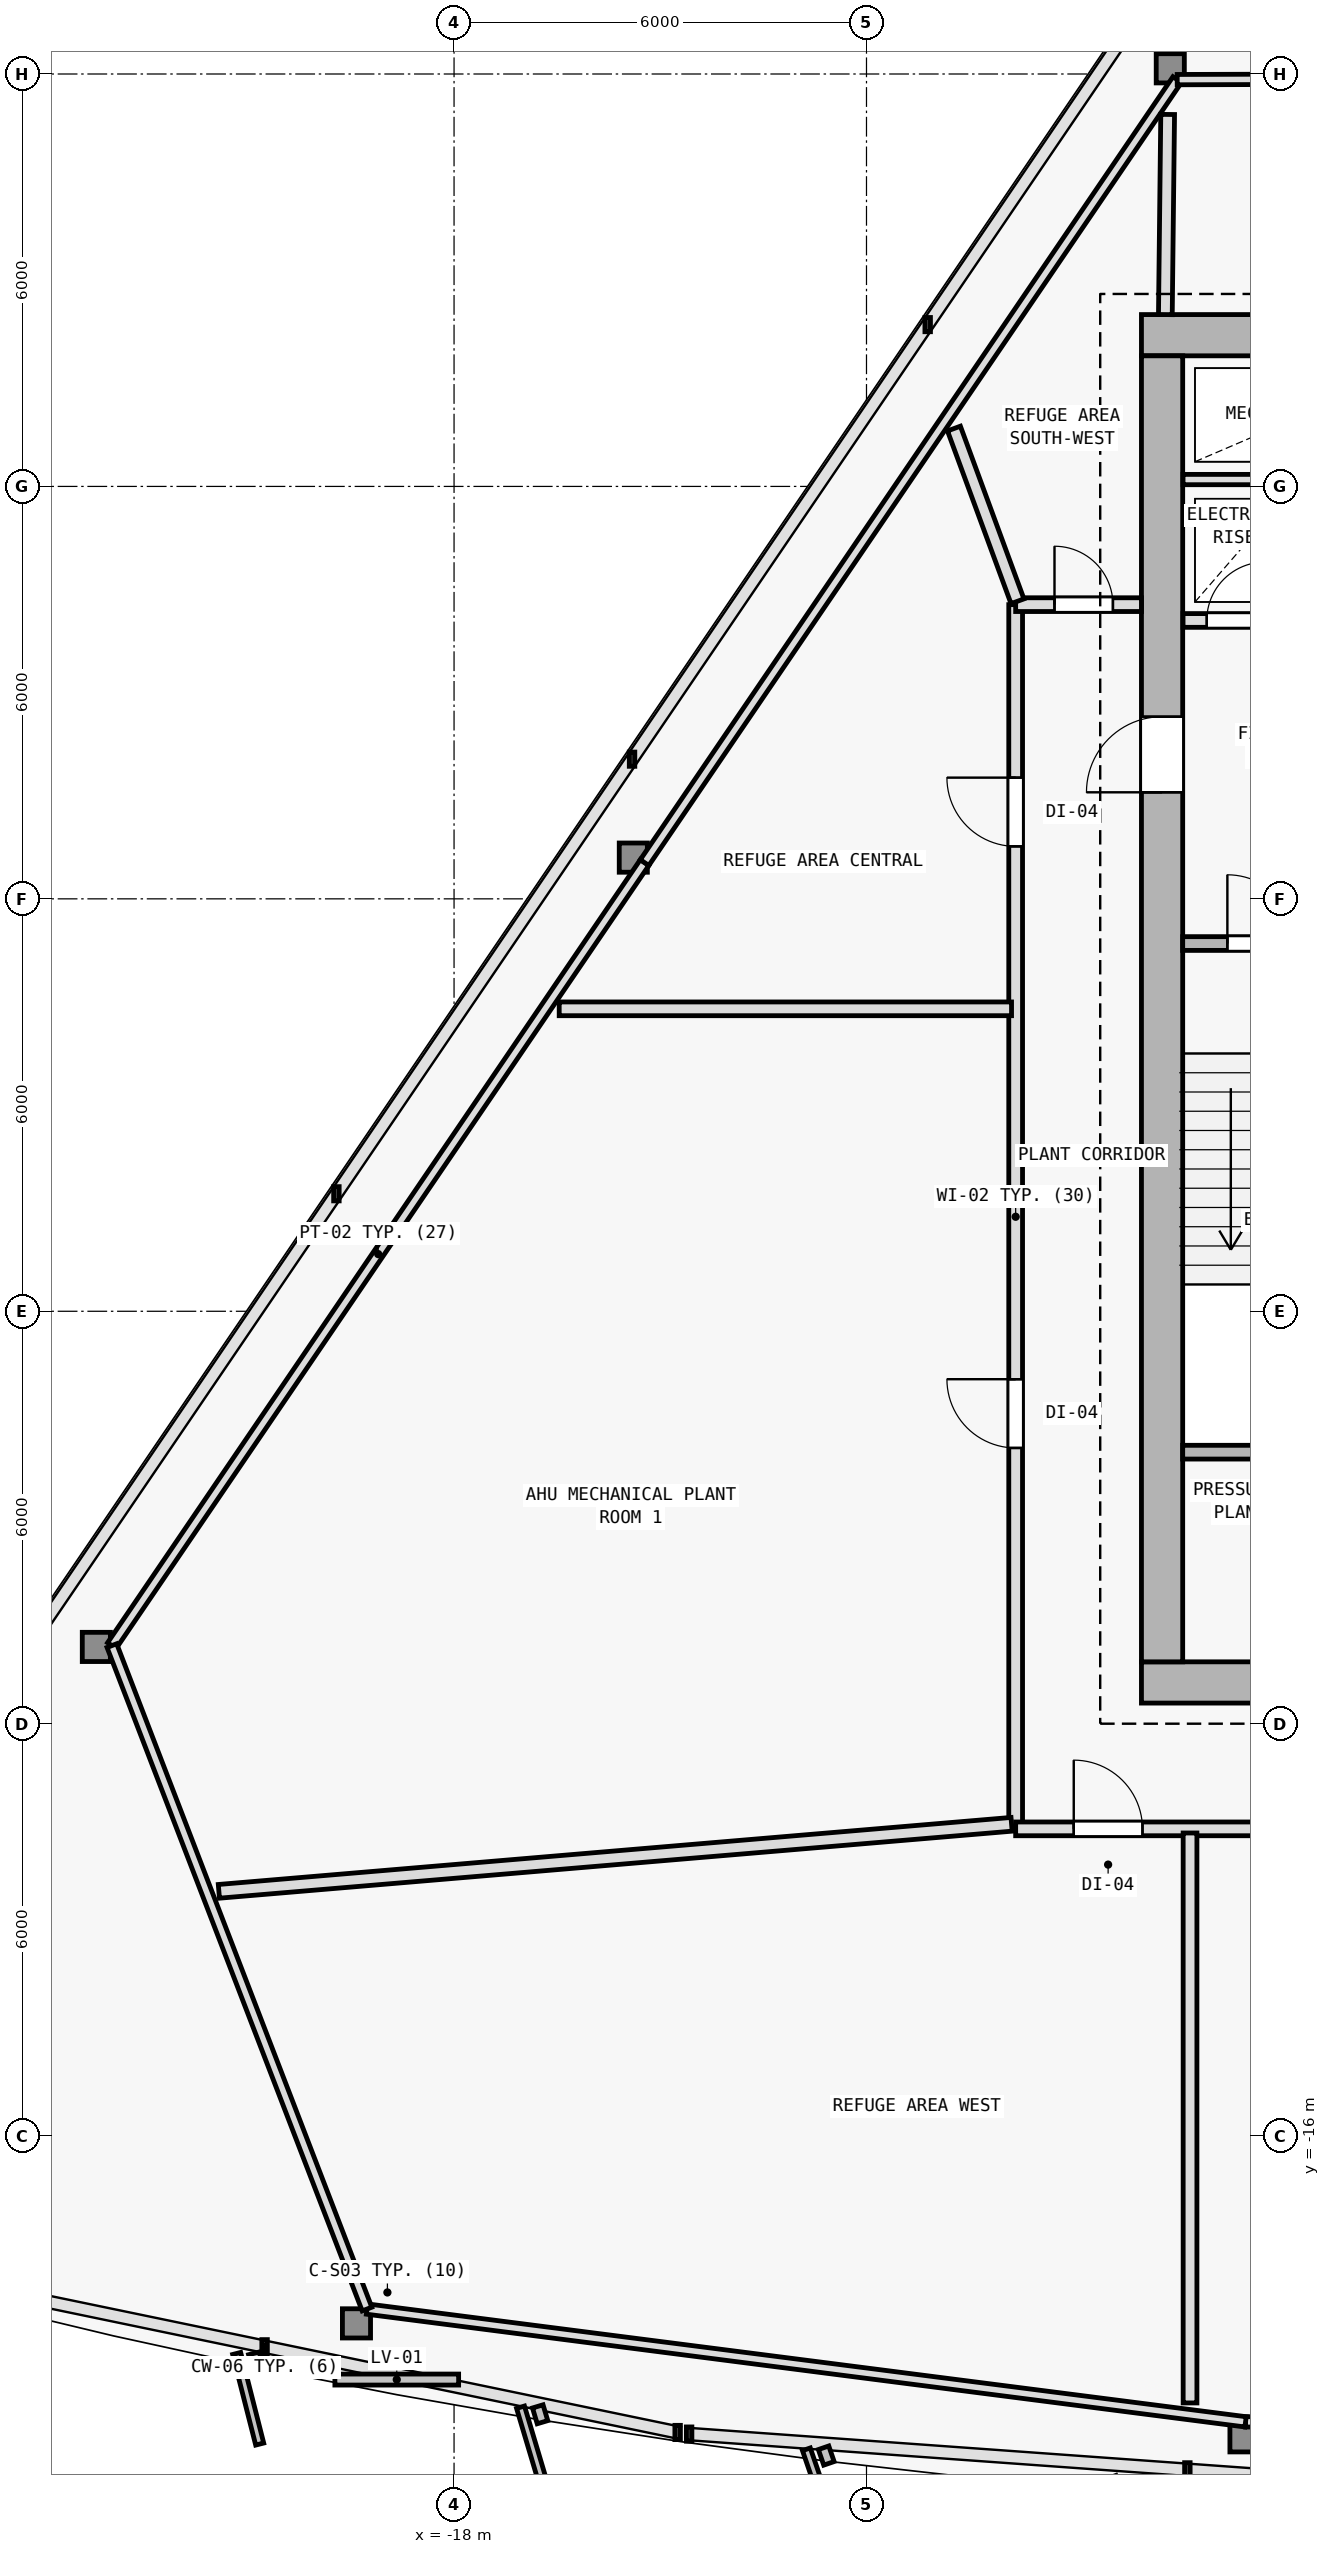
"""IFC4 building model, lengths in metres.
Left out: names, types, materials, properties, quantities, classifications, styles, units other than length and angle.
Written with IfcOpenShell. Run it as: python <this file> out.ifc"""

import sys

from ifc_helpers import new_model, si_unit, direction, frame, frame_2d, origin, origin_2d, place, context, subcontext, project, spatial, rectangle, i_section, extrude, element, fill, save


model = new_model("IFC4")
c1 = context("Model", 3, precision=1e-05, world=origin(), true_north=direction((0.0, 1.0)))
c2 = subcontext(c1, "Body", "Model", "MODEL_VIEW")
j1 = project(units=[si_unit("LENGTHUNIT", "METRE"), si_unit("PLANEANGLEUNIT", "RADIAN")], contexts=[c1])
p1 = place(None, origin())
s1 = spatial("IfcSite", under=j1, at=p1, CompositionType="ELEMENT")
p2 = place(p1, origin())
s2 = spatial("IfcBuilding", under=s1, at=p2, CompositionType="ELEMENT")
p3 = place(p2, frame((0.0, 0.0, 73.2)))
s3 = spatial("IfcBuildingStorey", under=s2, at=p3, CompositionType="ELEMENT", Elevation=73.2)
for number, where, z_axis, x_axis in (
    (1, (-7.7, -9.4, 0.0), (0.0, 0.0, 1.0), (1.0, 0.0, 0.0)),
    (2, (-7.7, 10.2, 0.0), (0.0, 0.0, 1.0), (1.0, 0.0, 0.0)),
    (3, (-7.7, 2.0, 0.0), (0.0, 0.0, 1.0), (1.0, 0.0, 0.0)),
):
    element("IfcColumn", number, at=place(p3, frame(where, z_axis=z_axis, x_axis=x_axis)), inside=s3, PredefinedType="COLUMN", context=c2, shape_type="SweptSolid", body=[
        extrude(i_section(OverallWidth=0.416, OverallDepth=0.446, WebThickness=0.025, FlangeThickness=0.04, FilletRadius=0.015, at=origin_2d()), origin(), (0.0, 0.0, 1.0), 4.8),
    ])
p4 = place(p3, frame((-19.42, -18.724, 0.006), z_axis=(0.01589889458, 0.025784745697, 0.999541080717), x_axis=(-0.851195920716, 0.524848077596, 0.0)))
e4 = element("IfcColumn", 4, at=p4, inside=s3, PredefinedType="COLUMN", context=c2, shape_type="SweptSolid", body=[
    extrude(i_section(OverallWidth=0.409, OverallDepth=0.425, WebThickness=0.021, FlangeThickness=0.034, FilletRadius=0.015, at=origin_2d()), origin(), (0.0, 0.0, 1.0), 4.791),
])
p5 = place(p3, frame((-6.509, -20.382, 0.006), z_axis=(0.005350994341, 0.027162666512, 0.999616704746), x_axis=(-0.981142984211, 0.193283327096, 0.0)))
e5 = element("IfcColumn", 5, at=p5, inside=s3, PredefinedType="COLUMN", context=c2, shape_type="SweptSolid", body=[
    extrude(i_section(OverallWidth=0.409, OverallDepth=0.425, WebThickness=0.021, FlangeThickness=0.034, FilletRadius=0.015, at=origin_2d()), origin(), (0.0, 0.0, 1.0), 4.791),
])
p6 = place(p3, frame((-7.581, 14.083, 0.006), z_axis=(0.006780355843, -0.001988224646, 0.999975036557), x_axis=(0.281384988428, 0.959594960537, 0.0)))
e6 = element("IfcColumn", 6, at=p6, inside=s3, PredefinedType="COLUMN", context=c2, shape_type="SweptSolid", body=[
    extrude(i_section(OverallWidth=0.409, OverallDepth=0.425, WebThickness=0.021, FlangeThickness=0.034, FilletRadius=0.015, at=origin_2d()), origin(), (0.0, 0.0, 1.0), 4.789),
])
p7 = place(p3, frame((-15.392, 2.6, 0.006), z_axis=(0.013100740252, 0.007340492593, 0.999887237529), x_axis=(-0.488810085697, 0.87239022239, 0.0)))
e7 = element("IfcColumn", 7, at=p7, inside=s3, PredefinedType="COLUMN", context=c2, shape_type="SweptSolid", body=[
    extrude(i_section(OverallWidth=0.409, OverallDepth=0.425, WebThickness=0.021, FlangeThickness=0.034, FilletRadius=0.015, at=origin_2d()), origin(), (0.0, 0.0, 1.0), 4.789),
])
p8 = place(p3, frame((-23.204, -8.883, 0.006), z_axis=(0.019468495457, 0.016665439828, 0.999671566466), x_axis=(-0.65029991508, 0.759677576638, 0.0)))
e8 = element("IfcColumn", 8, at=p8, inside=s3, PredefinedType="COLUMN", context=c2, shape_type="SweptSolid", body=[
    extrude(i_section(OverallWidth=0.409, OverallDepth=0.425, WebThickness=0.021, FlangeThickness=0.034, FilletRadius=0.015, at=origin_2d()), origin(), (0.0, 0.0, 1.0), 4.79),
])
p9 = place(p3, frame((-8.0, -9.4, 0.0), z_axis=(0.0, 0.0, 1.0), x_axis=(1.0, 0.0, 0.0)))
e9 = element("IfcWall", 9, at=p9, inside=s3, PredefinedType="SHEAR", context=c2, shape_type="SweptSolid", body=[
    extrude(rectangle(XDim=16.0, YDim=0.6, at=frame_2d((8.0, 0.0))), origin(), (0.0, 0.0, 1.0), 4.5),
])
p10 = place(p9, frame((9.65, 0.0, 0.0)))
e10 = element("IfcOpeningElement", 10, at=p10, cuts=e9, PredefinedType="OPENING", context=c2, shape_type="SweptSolid", body=[
    extrude(rectangle(XDim=1.5, YDim=2.2, at=frame_2d((0.75, 1.1))), frame((0.0, 0.31, 0.0), z_axis=(0.0, -1.0, 0.0), x_axis=(1.0, 0.0, 0.0)), (0.0, 0.0, 1.0), 0.62),
])
p11 = place(p3, frame((8.0, 10.2, 0.0), z_axis=(0.0, 0.0, 1.0), x_axis=(-1.0, 0.0, 0.0)))
e11 = element("IfcWall", 11, at=p11, inside=s3, PredefinedType="SHEAR", context=c2, shape_type="SweptSolid", body=[
    extrude(rectangle(XDim=16.0, YDim=0.6, at=frame_2d((8.0, 0.0))), origin(), (0.0, 0.0, 1.0), 4.5),
])
p12 = place(p3, frame((-7.7, -9.1, 0.0), z_axis=(0.0, 0.0, 1.0), x_axis=(0.0, 1.0, 0.0)))
e12 = element("IfcWall", 12, at=p12, inside=s3, PredefinedType="SHEAR", context=c2, shape_type="SweptSolid", body=[
    extrude(rectangle(XDim=19.0, YDim=0.6, at=frame_2d((9.5, 0.0))), origin(), (0.0, 0.0, 1.0), 4.5),
])
p13 = place(p12, frame((12.65, 0.0, 0.0)))
e13 = element("IfcOpeningElement", 13, at=p13, cuts=e12, PredefinedType="OPENING", context=c2, shape_type="SweptSolid", body=[
    extrude(rectangle(XDim=1.1, YDim=2.15, at=frame_2d((0.55, 1.075))), frame((0.0, 0.31, 0.0), z_axis=(0.0, -1.0, 0.0), x_axis=(1.0, 0.0, 0.0)), (0.0, 0.0, 1.0), 0.62),
])
p14 = place(p3, frame((-7.4, 1.35, 0.0), z_axis=(0.0, 0.0, 1.0), x_axis=(1.0, 0.0, 0.0)))
e14 = element("IfcWall", 14, at=p14, inside=s3, PredefinedType="SOLIDWALL", context=c2, shape_type="SweptSolid", body=[
    extrude(rectangle(XDim=3.35, YDim=0.2, at=frame_2d((1.675, 0.0))), origin(), (0.0, 0.0, 1.0), 4.5),
])
p15 = place(p14, frame((0.65, 0.0, 0.0)))
e15 = element("IfcOpeningElement", 15, at=p15, cuts=e14, PredefinedType="OPENING", context=c2, shape_type="SweptSolid", body=[
    extrude(rectangle(XDim=1.0, YDim=2.15, at=frame_2d((0.5, 1.075))), frame((0.0, 0.11, 0.0), z_axis=(0.0, -1.0, 0.0), x_axis=(1.0, 0.0, 0.0)), (0.0, 0.0, 1.0), 0.22),
])
p16 = place(p3, frame((-7.395, 6.05, 0.0), z_axis=(0.0, 0.0, 1.0), x_axis=(1.0, 0.0, 0.0)))
e16 = element("IfcWall", 16, at=p16, inside=s3, PredefinedType="SOLIDWALL", context=c2, shape_type="SweptSolid", body=[
    extrude(rectangle(XDim=3.545, YDim=0.2, at=frame_2d((1.772, 0.0))), origin(), (0.0, 0.0, 1.0), 4.5),
])
p17 = place(p16, frame((0.345, 0.0, 0.0)))
e17 = element("IfcOpeningElement", 17, at=p17, cuts=e16, PredefinedType="OPENING", context=c2, shape_type="SweptSolid", body=[
    extrude(rectangle(XDim=0.85, YDim=2.1, at=frame_2d((0.425, 1.05))), frame((0.0, 0.11, 0.0), z_axis=(0.0, -1.0, 0.0), x_axis=(1.0, 0.0, 0.0)), (0.0, 0.0, 1.0), 0.22),
])
p18 = place(p16, frame((2.145, 0.0, 0.0)))
e18 = element("IfcOpeningElement", 18, at=p18, cuts=e16, PredefinedType="OPENING", context=c2, shape_type="SweptSolid", body=[
    extrude(rectangle(XDim=0.85, YDim=2.1, at=frame_2d((0.425, 1.05))), frame((0.0, 0.11, 0.0), z_axis=(0.0, -1.0, 0.0), x_axis=(1.0, 0.0, 0.0)), (0.0, 0.0, 1.0), 0.22),
])
p19 = place(p3, frame((-7.395, 8.1, 0.0), z_axis=(0.0, 0.0, 1.0), x_axis=(1.0, 0.0, 0.0)))
e19 = element("IfcWall", 19, at=p19, inside=s3, PredefinedType="PARTITIONING", context=c2, shape_type="SweptSolid", body=[
    extrude(rectangle(XDim=3.545, YDim=0.15, at=frame_2d((1.772, 0.0))), origin(), (0.0, 0.0, 1.0), 4.5),
])
p20 = place(p3, frame((-7.4, -6.05, 0.0), z_axis=(0.0, 0.0, 1.0), x_axis=(1.0, 0.0, 0.0)))
e20 = element("IfcWall", 20, at=p20, inside=s3, PredefinedType="SOLIDWALL", context=c2, shape_type="SweptSolid", body=[
    extrude(rectangle(XDim=3.35, YDim=0.2, at=frame_2d((1.675, 0.0))), origin(), (0.0, 0.0, 1.0), 4.5),
])
p21 = place(p3, frame((-22.978, -8.864, 0.0), z_axis=(0.0, 0.0, 1.0), x_axis=(0.562466083544, 0.826820358278, 0.0)))
e21 = element("IfcWall", 21, at=p21, inside=s3, PredefinedType="PARTITIONING", context=c2, shape_type="SweptSolid", body=[
    extrude(rectangle(XDim=13.777, YDim=0.15, at=frame_2d((6.889, 0.0))), origin(), (0.0, 0.0, 1.0), 3.759),
])
p22 = place(p3, frame((-15.229, 2.527, 0.0), z_axis=(0.0, 0.0, 1.0), x_axis=(0.562470451541, 0.826817386817, 0.0)))
e22 = element("IfcWall", 22, at=p22, inside=s3, PredefinedType="PARTITIONING", context=c2, shape_type="SweptSolid", body=[
    extrude(rectangle(XDim=13.777, YDim=0.15, at=frame_2d((6.888, 0.0))), origin(), (0.0, 0.0, 1.0), 3.875),
])
p23 = place(p3, frame((-7.48, 13.918, 0.0), z_axis=(0.0, 0.0, 1.0), x_axis=(0.999996272289, 0.00273045938, 0.0)))
e23 = element("IfcWall", 23, at=p23, inside=s3, PredefinedType="PARTITIONING", context=c2, shape_type="SweptSolid", body=[
    extrude(rectangle(XDim=17.704, YDim=0.15, at=frame_2d((8.852, 0.0))), origin(), (0.0, 0.0, 1.0), 3.875),
])
p24 = place(p3, frame((6.486, -20.157, 0.0), z_axis=(0.0, 0.0, 1.0), x_axis=(-1.0, 0.0, 0.0)))
e24 = element("IfcWall", 24, at=p24, inside=s3, PredefinedType="PARTITIONING", context=c2, shape_type="SweptSolid", body=[
    extrude(rectangle(XDim=12.971, YDim=0.15, at=frame_2d((6.486, 0.0))), origin(), (0.0, 0.0, 1.0), 3.875),
])
p25 = place(p3, frame((-6.486, -20.157, 0.0), z_axis=(0.0, 0.0, 1.0), x_axis=(-0.991859037986, 0.127340679929, 0.0)))
e25 = element("IfcWall", 25, at=p25, inside=s3, PredefinedType="PARTITIONING", context=c2, shape_type="SweptSolid", body=[
    extrude(rectangle(XDim=12.886, YDim=0.15, at=frame_2d((6.443, 0.0))), origin(), (0.0, 0.0, 1.0), 3.875),
])
p26 = place(p3, frame((-19.266, -18.516, 0.0), z_axis=(0.0, 0.0, 1.0), x_axis=(-0.358930035046, 0.933364467902, 0.0)))
e26 = element("IfcWall", 26, at=p26, inside=s3, PredefinedType="PARTITIONING", context=c2, shape_type="SweptSolid", body=[
    extrude(rectangle(XDim=10.341, YDim=0.15, at=frame_2d((5.17, 0.0))), origin(), (0.0, 0.0, 1.0), 3.759),
])
p27 = place(p3, frame((-9.83, -11.53, 0.0), z_axis=(0.0, 0.0, 1.0), x_axis=(0.0, 1.0, 0.0)))
e27 = element("IfcWall", 27, at=p27, inside=s3, PredefinedType="SOLIDWALL", context=c2, shape_type="SweptSolid", body=[
    extrude(rectangle(XDim=17.81, YDim=0.2, at=frame_2d((8.905, 0.0))), origin(), (0.0, 0.0, 1.0), 3.759),
])
p28 = place(p27, frame((5.542, 0.0, 0.0)))
e28 = element("IfcOpeningElement", 28, at=p28, cuts=e27, PredefinedType="OPENING", context=c2, shape_type="SweptSolid", body=[
    extrude(rectangle(XDim=1.0, YDim=2.15, at=frame_2d((0.5, 1.075))), frame((0.0, 0.11, 0.0), z_axis=(0.0, -1.0, 0.0), x_axis=(1.0, 0.0, 0.0)), (0.0, 0.0, 1.0), 0.22),
])
p29 = place(p27, frame((14.293, 0.0, 0.0)))
e29 = element("IfcOpeningElement", 29, at=p29, cuts=e27, PredefinedType="OPENING", context=c2, shape_type="SweptSolid", body=[
    extrude(rectangle(XDim=1.0, YDim=2.15, at=frame_2d((0.5, 1.075))), frame((0.0, 0.11, 0.0), z_axis=(0.0, -1.0, 0.0), x_axis=(1.0, 0.0, 0.0)), (0.0, 0.0, 1.0), 0.22),
])
p30 = place(p3, frame((-9.83, 6.28, 0.0), z_axis=(0.0, 0.0, 1.0), x_axis=(1.0, 0.0, 0.0)))
e30 = element("IfcWall", 30, at=p30, inside=s3, PredefinedType="SOLIDWALL", context=c2, shape_type="SweptSolid", body=[
    extrude(rectangle(XDim=1.83, YDim=0.2, at=frame_2d((0.915, 0.0))), origin(), (0.0, 0.0, 1.0), 3.925),
])
p31 = place(p30, frame((0.565, 0.0, 0.0)))
e31 = element("IfcOpeningElement", 31, at=p31, cuts=e30, PredefinedType="OPENING", context=c2, shape_type="SweptSolid", body=[
    extrude(rectangle(XDim=0.85, YDim=2.1, at=frame_2d((0.425, 1.05))), frame((0.0, 0.11, 0.0), z_axis=(0.0, -1.0, 0.0), x_axis=(1.0, 0.0, 0.0)), (0.0, 0.0, 1.0), 0.22),
])
p32 = place(p3, frame((-9.83, -11.53, 0.0), z_axis=(0.0, 0.0, 1.0), x_axis=(1.0, 0.0, 0.0)))
e32 = element("IfcWall", 32, at=p32, inside=s3, PredefinedType="SOLIDWALL", context=c2, shape_type="SweptSolid", body=[
    extrude(rectangle(XDim=19.66, YDim=0.2, at=frame_2d((9.83, 0.0))), origin(), (0.0, 0.0, 1.0), 3.875),
])
p33 = place(p32, frame((0.845, 0.0, 0.0)))
e33 = element("IfcOpeningElement", 33, at=p33, cuts=e32, PredefinedType="OPENING", context=c2, shape_type="SweptSolid", body=[
    extrude(rectangle(XDim=1.0, YDim=2.15, at=frame_2d((0.5, 1.075))), frame((0.0, 0.11, 0.0), z_axis=(0.0, -1.0, 0.0), x_axis=(1.0, 0.0, 0.0)), (0.0, 0.0, 1.0), 0.22),
])
p34 = place(p32, frame((9.33, 0.0, 0.0)))
e34 = element("IfcOpeningElement", 34, at=p34, cuts=e32, PredefinedType="OPENING", context=c2, shape_type="SweptSolid", body=[
    extrude(rectangle(XDim=1.0, YDim=2.15, at=frame_2d((0.5, 1.075))), frame((0.0, 0.11, 0.0), z_axis=(0.0, -1.0, 0.0), x_axis=(1.0, 0.0, 0.0)), (0.0, 0.0, 1.0), 0.22),
])
p35 = place(p32, frame((17.815, 0.0, 0.0)))
e35 = element("IfcOpeningElement", 35, at=p35, cuts=e32, PredefinedType="OPENING", context=c2, shape_type="SweptSolid", body=[
    extrude(rectangle(XDim=1.0, YDim=2.15, at=frame_2d((0.5, 1.075))), frame((0.0, 0.11, 0.0), z_axis=(0.0, -1.0, 0.0), x_axis=(1.0, 0.0, 0.0)), (0.0, 0.0, 1.0), 0.22),
])
p36 = place(p3, frame((-9.89, 0.4, 0.0), z_axis=(0.0, 0.0, 1.0), x_axis=(-1.0, 0.0, 0.0)))
e36 = element("IfcWall", 36, at=p36, inside=s3, PredefinedType="SOLIDWALL", context=c2, shape_type="SweptSolid", body=[
    extrude(rectangle(XDim=6.58, YDim=0.2, at=frame_2d((3.29, 0.0))), origin(), (0.0, 0.0, 1.0), 3.975),
])
p37 = place(p3, frame((-9.889, -11.464, 0.0), z_axis=(0.0, 0.0, 1.0), x_axis=(-0.996442430759, -0.084276225487, 0.0)))
e37 = element("IfcWall", 37, at=p37, inside=s3, PredefinedType="SOLIDWALL", context=c2, shape_type="SweptSolid", body=[
    extrude(rectangle(XDim=11.573, YDim=0.2, at=frame_2d((5.787, 0.0))), origin(), (0.0, 0.0, 1.0), 3.875),
])
p38 = place(p3, frame((-7.293, -11.59, 0.0), z_axis=(0.0, 0.0, 1.0), x_axis=(0.0, -1.0, 0.0)))
e38 = element("IfcWall", 38, at=p38, inside=s3, PredefinedType="SOLIDWALL", context=c2, shape_type="SweptSolid", body=[
    extrude(rectangle(XDim=8.292, YDim=0.2, at=frame_2d((4.146, 0.0))), origin(), (0.0, 0.0, 1.0), 3.975),
])
p39 = place(p3, frame((-7.652, 10.5, 0.0), z_axis=(0.0, 0.0, 1.0), x_axis=(0.011402914465, 0.999934984657, 0.0)))
e39 = element("IfcWall", 39, at=p39, inside=s3, PredefinedType="SOLIDWALL", context=c2, shape_type="SweptSolid", body=[
    extrude(rectangle(XDim=2.912, YDim=0.2, at=frame_2d((1.456, 0.0))), origin(), (0.0, 0.0, 1.0), 3.875),
])
p40 = place(p3, frame((-9.803, 6.329, 0.0), z_axis=(0.0, 0.0, 1.0), x_axis=(-0.345160152736, 0.938543802368, 0.0)))
e40 = element("IfcWall", 40, at=p40, inside=s3, PredefinedType="SOLIDWALL", context=c2, shape_type="SweptSolid", body=[
    extrude(rectangle(XDim=2.677, YDim=0.2, at=frame_2d((1.339, 0.0))), origin(), (0.0, 0.0, 1.0), 3.925),
])
p41 = place(p13, origin())
e41 = element("IfcDoor", 41, at=p41, inside=s3, OperationType="SINGLE_SWING_LEFT", PredefinedType="DOOR", context=c2, shape_type="SweptSolid", body=[
    extrude(rectangle(XDim=1.1, YDim=2.15, at=frame_2d((0.55, 1.075))), frame((0.0, 0.025, 0.0), z_axis=(0.0, -1.0, 0.0), x_axis=(1.0, 0.0, 0.0)), (0.0, 0.0, 1.0), 0.05),
])
fill(e13, e41)
p42 = place(p15, origin())
e42 = element("IfcDoor", 42, at=p42, inside=s3, OperationType="SINGLE_SWING_LEFT", PredefinedType="DOOR", context=c2, shape_type="SweptSolid", body=[
    extrude(rectangle(XDim=1.0, YDim=2.15, at=frame_2d((0.5, 1.075))), frame((0.0, 0.025, 0.0), z_axis=(0.0, -1.0, 0.0), x_axis=(1.0, 0.0, 0.0)), (0.0, 0.0, 1.0), 0.05),
])
fill(e15, e42)
p43 = place(p17, origin())
e43 = element("IfcDoor", 43, at=p43, inside=s3, OperationType="SINGLE_SWING_RIGHT", PredefinedType="DOOR", context=c2, shape_type="SweptSolid", body=[
    extrude(rectangle(XDim=0.85, YDim=2.1, at=frame_2d((0.425, 1.05))), frame((0.0, 0.025, 0.0), z_axis=(0.0, -1.0, 0.0), x_axis=(1.0, 0.0, 0.0)), (0.0, 0.0, 1.0), 0.05),
])
fill(e17, e43)
p44 = place(p28, origin())
e44 = element("IfcDoor", 44, at=p44, inside=s3, OperationType="SINGLE_SWING_RIGHT", PredefinedType="DOOR", context=c2, shape_type="SweptSolid", body=[
    extrude(rectangle(XDim=1.0, YDim=2.15, at=frame_2d((0.5, 1.075))), frame((0.0, 0.025, 0.0), z_axis=(0.0, -1.0, 0.0), x_axis=(1.0, 0.0, 0.0)), (0.0, 0.0, 1.0), 0.05),
])
fill(e28, e44)
p45 = place(p33, origin())
e45 = element("IfcDoor", 45, at=p45, inside=s3, OperationType="SINGLE_SWING_LEFT", PredefinedType="DOOR", context=c2, shape_type="SweptSolid", body=[
    extrude(rectangle(XDim=1.0, YDim=2.15, at=frame_2d((0.5, 1.075))), frame((0.0, 0.025, 0.0), z_axis=(0.0, -1.0, 0.0), x_axis=(1.0, 0.0, 0.0)), (0.0, 0.0, 1.0), 0.05),
])
fill(e33, e45)
p46 = place(p31, origin())
e46 = element("IfcDoor", 46, at=p46, inside=s3, OperationType="SINGLE_SWING_LEFT", PredefinedType="DOOR", context=c2, shape_type="SweptSolid", body=[
    extrude(rectangle(XDim=0.85, YDim=2.1, at=frame_2d((0.425, 1.05))), frame((0.0, 0.025, 0.0), z_axis=(0.0, -1.0, 0.0), x_axis=(1.0, 0.0, 0.0)), (0.0, 0.0, 1.0), 0.05),
])
fill(e31, e46)
p47 = place(p29, origin())
e47 = element("IfcDoor", 47, at=p47, inside=s3, OperationType="SINGLE_SWING_RIGHT", PredefinedType="DOOR", context=c2, shape_type="SweptSolid", body=[
    extrude(rectangle(XDim=1.0, YDim=2.15, at=frame_2d((0.5, 1.075))), frame((0.0, 0.025, 0.0), z_axis=(0.0, -1.0, 0.0), x_axis=(1.0, 0.0, 0.0)), (0.0, 0.0, 1.0), 0.05),
])
fill(e29, e47)
save(model, sys.argv[1])
